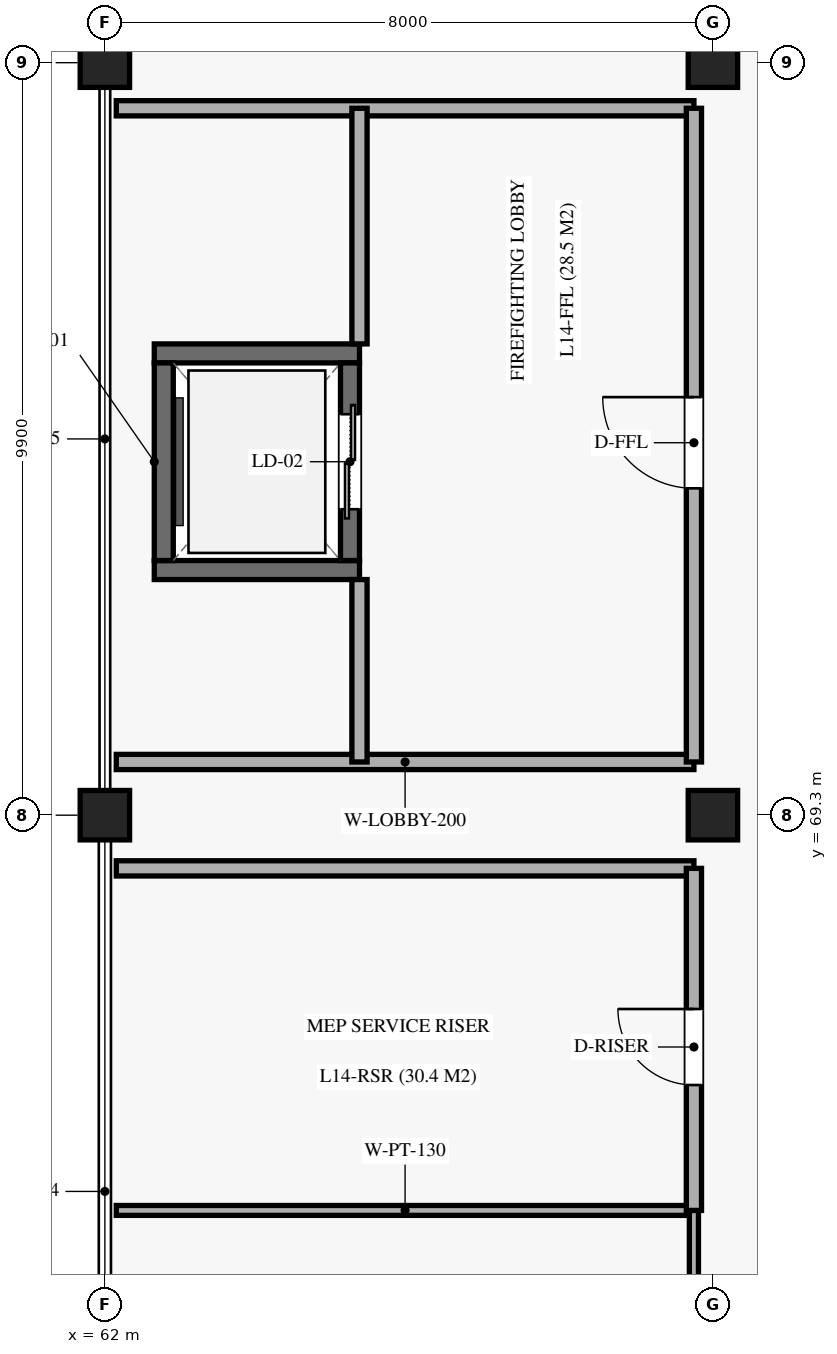
"""IFC4 building model, lengths in metres.
Left out: names, types, materials, properties, quantities, classifications, styles, units other than length and angle.
Written with IfcOpenShell. Run it as: python <this file> out.ifc"""

import sys

from ifc_helpers import new_model, si_unit, direction, frame, frame_2d, origin, origin_2d, place, context, subcontext, project, spatial, rectangle, extrude, element, fill, save


model = new_model("IFC4")
c1 = context("Model", 3, precision=1e-05, world=origin(), true_north=direction((0.0, 1.0)))
c2 = subcontext(c1, "Body", "Model", "MODEL_VIEW")
j1 = project(units=[si_unit("LENGTHUNIT", "METRE"), si_unit("PLANEANGLEUNIT", "RADIAN")], contexts=[c1])
p1 = place(None, origin())
s1 = spatial("IfcSite", under=j1, at=p1, CompositionType="ELEMENT")
p2 = place(p1, origin())
s2 = spatial("IfcBuilding", under=s1, at=p2, CompositionType="ELEMENT")
p3 = place(p2, frame((0.0, 0.0, 70.38)))
s3 = spatial("IfcBuildingStorey", under=s2, at=p3, CompositionType="ELEMENT", Elevation=70.38)
for number, where, z_axis, x_axis in (
    (1, (62.0, 69.3, 0.0), (0.0, 0.0, 1.0), (1.0, 0.0, 0.0)),
    (2, (62.0, 79.2, 0.0), (0.0, 0.0, 1.0), (1.0, 0.0, 0.0)),
    (3, (70.0, 69.3, 0.0), (0.0, 0.0, 1.0), (1.0, 0.0, 0.0)),
    (4, (70.0, 79.2, 0.0), (0.0, 0.0, 1.0), (1.0, 0.0, 0.0)),
):
    element("IfcColumn", number, at=place(p3, frame(where, z_axis=z_axis, x_axis=x_axis)), inside=s3, PredefinedType="COLUMN", context=c2, shape_type="SweptSolid", body=[
        extrude(rectangle(XDim=0.65, YDim=0.65, at=origin_2d()), origin(), (0.0, 0.0, 1.0), 4.08),
    ])
for number, where, z_axis, x_axis in (
    (5, (62.65, 72.525, 0.0), (0.0, 0.0, 1.0), (1.0, 0.0, 0.0)),
    (6, (62.65, 75.375, 0.0), (0.0, 0.0, 1.0), (1.0, 0.0, 0.0)),
):
    element("IfcWall", number, at=place(p3, frame(where, z_axis=z_axis, x_axis=x_axis)), inside=s3, PredefinedType="SOLIDWALL", context=c2, shape_type="SweptSolid", body=[
        extrude(rectangle(XDim=2.7, YDim=0.25, at=frame_2d((1.35, 0.0))), origin(), (0.0, 0.0, 1.0), 3.81),
    ])
p4 = place(p3, frame((62.775, 72.65, 0.0), z_axis=(0.0, 0.0, 1.0), x_axis=(0.0, 1.0, 0.0)))
e7 = element("IfcWall", 7, at=p4, inside=s3, PredefinedType="SOLIDWALL", context=c2, shape_type="SweptSolid", body=[
    extrude(rectangle(XDim=2.6, YDim=0.25, at=frame_2d((1.3, 0.0))), origin(), (0.0, 0.0, 1.0), 3.81),
])
p5 = place(p3, frame((65.225, 72.65, 0.0), z_axis=(0.0, 0.0, 1.0), x_axis=(0.0, 1.0, 0.0)))
e8 = element("IfcWall", 8, at=p5, inside=s3, PredefinedType="SOLIDWALL", context=c2, shape_type="SweptSolid", body=[
    extrude(rectangle(XDim=2.6, YDim=0.25, at=frame_2d((1.3, 0.0))), origin(), (0.0, 0.0, 1.0), 3.81),
])
p6 = place(p5, frame((0.675, 0.0, 0.0)))
e9 = element("IfcOpeningElement", 9, at=p6, cuts=e8, PredefinedType="OPENING", context=c2, shape_type="SweptSolid", body=[
    extrude(rectangle(XDim=1.25, YDim=2.2, at=frame_2d((0.625, 1.1))), frame((0.0, 0.135, 0.0), z_axis=(0.0, -1.0, 0.0), x_axis=(1.0, 0.0, 0.0)), (0.0, 0.0, 1.0), 0.27),
])
for number, where, z_axis, x_axis in (
    (10, (62.15, 70.0, 0.0), (0.0, 0.0, 1.0), (1.0, 0.0, 0.0)),
    (11, (62.15, 78.6, 0.0), (0.0, 0.0, 1.0), (1.0, 0.0, 0.0)),
):
    element("IfcWall", number, at=place(p3, frame(where, z_axis=z_axis, x_axis=x_axis)), inside=s3, PredefinedType="SOLIDWALL", context=c2, shape_type="SweptSolid", body=[
        extrude(rectangle(XDim=7.6, YDim=0.2, at=frame_2d((3.8, 0.0))), origin(), (0.0, 0.0, 1.0), 2.95),
    ])
p7 = place(p3, frame((65.35, 70.0, 0.0), z_axis=(0.0, 0.0, 1.0), x_axis=(0.0, 1.0, 0.0)))
e12 = element("IfcWall", 12, at=p7, inside=s3, PredefinedType="SOLIDWALL", context=c2, shape_type="SweptSolid", body=[
    extrude(rectangle(XDim=2.4, YDim=0.2, at=frame_2d((1.2, 0.0))), origin(), (0.0, 0.0, 1.0), 2.95),
])
p8 = place(p3, frame((65.35, 75.5, 0.0), z_axis=(0.0, 0.0, 1.0), x_axis=(0.0, 1.0, 0.0)))
e13 = element("IfcWall", 13, at=p8, inside=s3, PredefinedType="SOLIDWALL", context=c2, shape_type="SweptSolid", body=[
    extrude(rectangle(XDim=3.1, YDim=0.2, at=frame_2d((1.55, 0.0))), origin(), (0.0, 0.0, 1.0), 2.95),
])
p9 = place(p3, frame((69.75, 70.0, 0.0), z_axis=(0.0, 0.0, 1.0), x_axis=(0.0, 1.0, 0.0)))
e14 = element("IfcWall", 14, at=p9, inside=s3, PredefinedType="SOLIDWALL", context=c2, shape_type="SweptSolid", body=[
    extrude(rectangle(XDim=8.6, YDim=0.2, at=frame_2d((4.3, 0.0))), origin(), (0.0, 0.0, 1.0), 2.95),
])
p10 = place(p9, frame((3.6, 0.0, 0.0)))
e15 = element("IfcOpeningElement", 15, at=p10, cuts=e14, PredefinedType="OPENING", context=c2, shape_type="SweptSolid", body=[
    extrude(rectangle(XDim=1.2, YDim=2.25, at=frame_2d((0.6, 1.125))), frame((0.0, 0.11, 0.0), z_axis=(0.0, -1.0, 0.0), x_axis=(1.0, 0.0, 0.0)), (0.0, 0.0, 1.0), 0.22),
])
p11 = place(p3, frame((62.15, 64.1, 0.0), z_axis=(0.0, 0.0, 1.0), x_axis=(1.0, 0.0, 0.0)))
e16 = element("IfcWall", 16, at=p11, inside=s3, PredefinedType="PARTITIONING", context=c2, shape_type="SweptSolid", body=[
    extrude(rectangle(XDim=7.6, YDim=0.13, at=frame_2d((3.8, 0.0))), origin(), (0.0, 0.0, 1.0), 2.95),
])
p12 = place(p3, frame((69.75, 59.9, 0.0), z_axis=(0.0, 0.0, 1.0), x_axis=(0.0, 1.0, 0.0)))
e17 = element("IfcWall", 17, at=p12, inside=s3, PredefinedType="PARTITIONING", context=c2, shape_type="SweptSolid", body=[
    extrude(rectangle(XDim=4.2, YDim=0.12, at=frame_2d((2.1, 0.0))), origin(), (0.0, 0.0, 1.0), 2.95),
])
p13 = place(p12, frame((1.5, 0.0, 0.0)))
e18 = element("IfcOpeningElement", 18, at=p13, cuts=e17, PredefinedType="OPENING", context=c2, shape_type="SweptSolid", body=[
    extrude(rectangle(XDim=0.95, YDim=2.1, at=frame_2d((0.475, 1.05))), frame((0.0, 0.07, 0.0), z_axis=(0.0, -1.0, 0.0), x_axis=(1.0, 0.0, 0.0)), (0.0, 0.0, 1.0), 0.14),
])
p14 = place(p3, frame((62.15, 68.6, 0.0), z_axis=(0.0, 0.0, 1.0), x_axis=(1.0, 0.0, 0.0)))
e19 = element("IfcWall", 19, at=p14, inside=s3, PredefinedType="SOLIDWALL", context=c2, shape_type="SweptSolid", body=[
    extrude(rectangle(XDim=7.6, YDim=0.2, at=frame_2d((3.8, 0.0))), origin(), (0.0, 0.0, 1.0), 2.95),
])
p15 = place(p3, frame((69.75, 64.1, 0.0), z_axis=(0.0, 0.0, 1.0), x_axis=(0.0, 1.0, 0.0)))
e20 = element("IfcWall", 20, at=p15, inside=s3, PredefinedType="SOLIDWALL", context=c2, shape_type="SweptSolid", body=[
    extrude(rectangle(XDim=4.5, YDim=0.2, at=frame_2d((2.25, 0.0))), origin(), (0.0, 0.0, 1.0), 2.95),
])
p16 = place(p15, frame((1.65, 0.0, 0.0)))
e21 = element("IfcOpeningElement", 21, at=p16, cuts=e20, PredefinedType="OPENING", context=c2, shape_type="SweptSolid", body=[
    extrude(rectangle(XDim=1.0, YDim=2.15, at=frame_2d((0.5, 1.075))), frame((0.0, 0.11, 0.0), z_axis=(0.0, -1.0, 0.0), x_axis=(1.0, 0.0, 0.0)), (0.0, 0.0, 1.0), 0.22),
])
p17 = place(p6, origin())
e22 = element("IfcDoor", 22, at=p17, inside=s3, OperationType="DOUBLE_DOOR_SLIDING", PredefinedType="DOOR", context=c2, shape_type="SweptSolid", body=[
    extrude(rectangle(XDim=1.25, YDim=2.2, at=frame_2d((0.625, 1.1))), frame((0.0, 0.025, 0.0), z_axis=(0.0, -1.0, 0.0), x_axis=(1.0, 0.0, 0.0)), (0.0, 0.0, 1.0), 0.05),
])
fill(e9, e22)
p18 = place(p10, origin())
e23 = element("IfcDoor", 23, at=p18, inside=s3, OperationType="SINGLE_SWING_RIGHT", PredefinedType="DOOR", context=c2, shape_type="SweptSolid", body=[
    extrude(rectangle(XDim=1.2, YDim=2.25, at=frame_2d((0.6, 1.125))), frame((0.0, 0.025, 0.0), z_axis=(0.0, -1.0, 0.0), x_axis=(1.0, 0.0, 0.0)), (0.0, 0.0, 1.0), 0.05),
])
fill(e15, e23)
p19 = place(p16, origin())
e24 = element("IfcDoor", 24, at=p19, inside=s3, OperationType="SINGLE_SWING_RIGHT", PredefinedType="DOOR", context=c2, shape_type="SweptSolid", body=[
    extrude(rectangle(XDim=1.0, YDim=2.15, at=frame_2d((0.5, 1.075))), frame((0.0, 0.025, 0.0), z_axis=(0.0, -1.0, 0.0), x_axis=(1.0, 0.0, 0.0)), (0.0, 0.0, 1.0), 0.05),
])
fill(e21, e24)
save(model, sys.argv[1])
